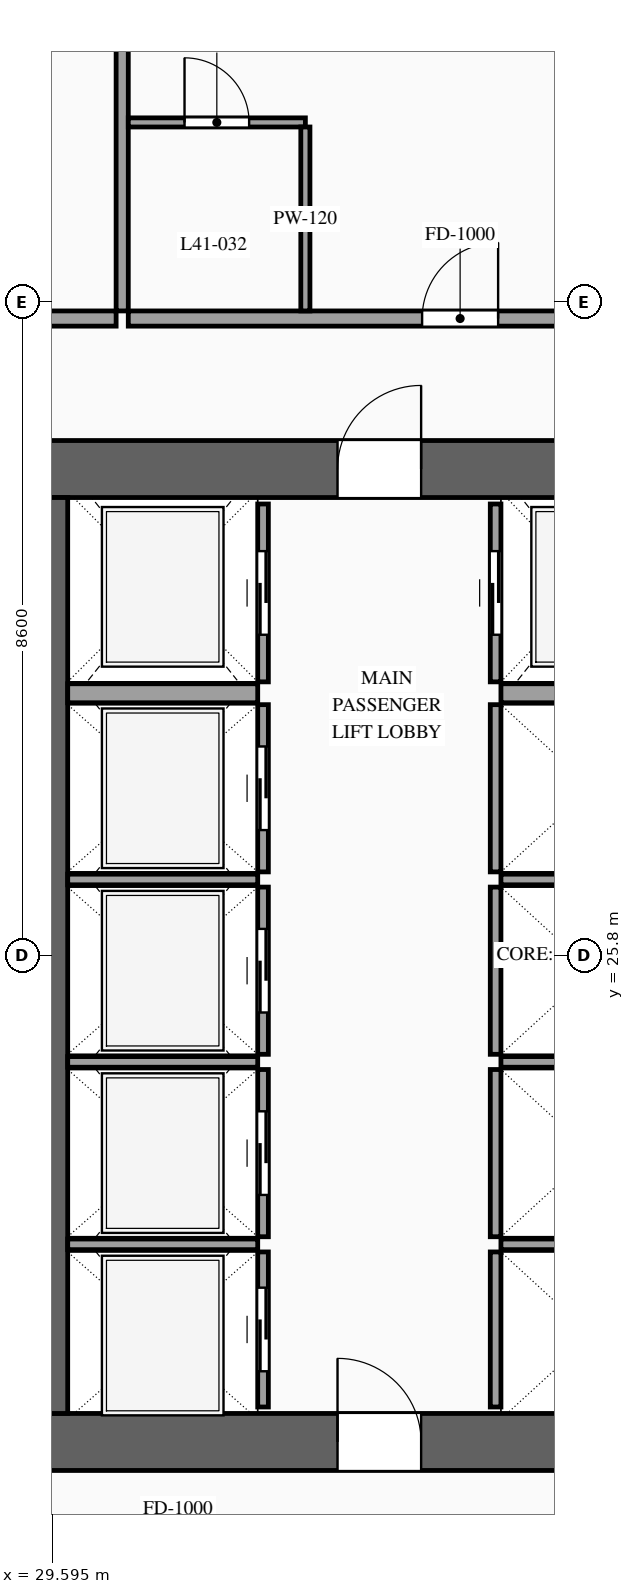
"""IFC4 building model, lengths in metres.
Left out: names, types, materials, properties, quantities, classifications, styles, units other than length and angle.
Written with IfcOpenShell. Run it as: python <this file> out.ifc"""

import sys

from ifc_helpers import new_model, si_unit, direction, frame, frame_2d, origin, place, context, subcontext, project, spatial, rectangle, extrude, source, transform, mapped, element, fill, save


model = new_model("IFC4")
c1 = context("Model", 3, precision=1e-05, world=origin(), true_north=direction((0.0, 1.0)))
c2 = subcontext(c1, "Body", "Model", "MODEL_VIEW")
j1 = project(units=[si_unit("LENGTHUNIT", "METRE"), si_unit("PLANEANGLEUNIT", "RADIAN")], contexts=[c1])
p1 = place(None, origin())
s1 = spatial("IfcSite", under=j1, at=p1, CompositionType="ELEMENT")
p2 = place(p1, origin())
s2 = spatial("IfcBuilding", under=s1, at=p2, CompositionType="ELEMENT")
p3 = place(p2, frame((0.0, 0.0, 156.0)))
s3 = spatial("IfcBuildingStorey", under=s2, at=p3, CompositionType="ELEMENT", Elevation=156.0)
p4 = place(p3, frame((23.425, 19.4, 0.0), z_axis=(0.0, 0.0, 1.0), x_axis=(1.0, 0.0, 0.0)))
e1 = element("IfcWall", 1, at=p4, inside=s3, PredefinedType="SHEAR", context=c2, shape_type="SweptSolid", body=[
    extrude(rectangle(XDim=27.15, YDim=0.75, at=frame_2d((13.575, 0.0))), origin(), (0.0, 0.0, 1.0), 3.6),
])
p5 = place(p4, frame((2.025, 0.0, 0.0)))
e2 = element("IfcOpeningElement", 2, at=p5, cuts=e1, PredefinedType="OPENING", context=c2, shape_type="SweptSolid", body=[
    extrude(rectangle(XDim=1.1, YDim=2.2, at=frame_2d((0.55, 1.1))), frame((0.0, 0.39, 0.0), z_axis=(0.0, -1.0, 0.0), x_axis=(1.0, 0.0, 0.0)), (0.0, 0.0, 1.0), 0.78),
])
p6 = place(p4, frame((9.925, 0.0, 0.0)))
e3 = element("IfcOpeningElement", 3, at=p6, cuts=e1, PredefinedType="OPENING", context=c2, shape_type="SweptSolid", body=[
    extrude(rectangle(XDim=1.1, YDim=2.2, at=frame_2d((0.55, 1.1))), frame((0.0, 0.39, 0.0), z_axis=(0.0, -1.0, 0.0), x_axis=(1.0, 0.0, 0.0)), (0.0, 0.0, 1.0), 0.78),
])
p7 = place(p4, frame((23.125, 0.0, 0.0)))
e4 = element("IfcOpeningElement", 4, at=p7, cuts=e1, PredefinedType="OPENING", context=c2, shape_type="SweptSolid", body=[
    extrude(rectangle(XDim=1.1, YDim=2.2, at=frame_2d((0.55, 1.1))), frame((0.0, 0.39, 0.0), z_axis=(0.0, -1.0, 0.0), x_axis=(1.0, 0.0, 0.0)), (0.0, 0.0, 1.0), 0.78),
])
p8 = place(p4, frame((19.745, 0.0, 0.0)))
e5 = element("IfcOpeningElement", 5, at=p8, cuts=e1, PredefinedType="OPENING", context=c2, shape_type="SweptSolid", body=[
    extrude(rectangle(XDim=0.9, YDim=2.15, at=frame_2d((0.45, 1.075))), frame((0.0, 0.39, 0.0), z_axis=(0.0, -1.0, 0.0), x_axis=(1.0, 0.0, 0.0)), (0.0, 0.0, 1.0), 0.78),
])
p9 = place(p4, frame((18.305, 0.0, 0.0)))
e6 = element("IfcOpeningElement", 6, at=p9, cuts=e1, PredefinedType="OPENING", context=c2, shape_type="SweptSolid", body=[
    extrude(rectangle(XDim=0.9, YDim=2.15, at=frame_2d((0.45, 1.075))), frame((0.0, 0.39, 0.0), z_axis=(0.0, -1.0, 0.0), x_axis=(1.0, 0.0, 0.0)), (0.0, 0.0, 1.0), 0.78),
])
p10 = place(p3, frame((23.425, 32.2, 0.0), z_axis=(0.0, 0.0, 1.0), x_axis=(1.0, 0.0, 0.0)))
e7 = element("IfcWall", 7, at=p10, inside=s3, PredefinedType="SHEAR", context=c2, shape_type="SweptSolid", body=[
    extrude(rectangle(XDim=27.15, YDim=0.75, at=frame_2d((13.575, 0.0))), origin(), (0.0, 0.0, 1.0), 3.6),
])
p11 = place(p10, frame((4.645, 0.0, 0.0)))
e8 = element("IfcOpeningElement", 8, at=p11, cuts=e7, PredefinedType="OPENING", context=c2, shape_type="SweptSolid", body=[
    extrude(rectangle(XDim=0.9, YDim=2.15, at=frame_2d((0.45, 1.075))), frame((0.0, 0.39, 0.0), z_axis=(0.0, -1.0, 0.0), x_axis=(1.0, 0.0, 0.0)), (0.0, 0.0, 1.0), 0.78),
])
p12 = place(p10, frame((9.925, 0.0, 0.0)))
e9 = element("IfcOpeningElement", 9, at=p12, cuts=e7, PredefinedType="OPENING", context=c2, shape_type="SweptSolid", body=[
    extrude(rectangle(XDim=1.1, YDim=2.2, at=frame_2d((0.55, 1.1))), frame((0.0, 0.39, 0.0), z_axis=(0.0, -1.0, 0.0), x_axis=(1.0, 0.0, 0.0)), (0.0, 0.0, 1.0), 0.78),
])
p13 = place(p10, frame((15.775, 0.0, 0.0)))
e10 = element("IfcOpeningElement", 10, at=p13, cuts=e7, PredefinedType="OPENING", context=c2, shape_type="SweptSolid", body=[
    extrude(rectangle(XDim=1.1, YDim=2.2, at=frame_2d((0.55, 1.1))), frame((0.0, 0.39, 0.0), z_axis=(0.0, -1.0, 0.0), x_axis=(1.0, 0.0, 0.0)), (0.0, 0.0, 1.0), 0.78),
])
p14 = place(p10, frame((18.305, 0.0, 0.0)))
e11 = element("IfcOpeningElement", 11, at=p14, cuts=e7, PredefinedType="OPENING", context=c2, shape_type="SweptSolid", body=[
    extrude(rectangle(XDim=0.9, YDim=2.15, at=frame_2d((0.45, 1.075))), frame((0.0, 0.39, 0.0), z_axis=(0.0, -1.0, 0.0), x_axis=(1.0, 0.0, 0.0)), (0.0, 0.0, 1.0), 0.78),
])
p15 = place(p10, frame((19.745, 0.0, 0.0)))
e12 = element("IfcOpeningElement", 12, at=p15, cuts=e7, PredefinedType="OPENING", context=c2, shape_type="SweptSolid", body=[
    extrude(rectangle(XDim=0.9, YDim=2.15, at=frame_2d((0.45, 1.075))), frame((0.0, 0.39, 0.0), z_axis=(0.0, -1.0, 0.0), x_axis=(1.0, 0.0, 0.0)), (0.0, 0.0, 1.0), 0.78),
])
m1 = source(origin(), c2, "Body", "SweptSolid", [
    extrude(rectangle(XDim=12.05, YDim=0.3, at=frame_2d((6.025, 0.0))), origin(), (0.0, 0.0, 1.0), 3.6),
])
p16 = place(p3, frame((29.65, 19.775, 0.0), z_axis=(0.0, 0.0, 1.0), x_axis=(0.0, 1.0, 0.0)))
e13 = element("IfcWall", 13, at=p16, inside=s3, PredefinedType="SOLIDWALL", context=c2, shape_type="MappedRepresentation", body=[
    mapped(m1, transform((0.0, 0.0, 0.0), scale=1.0)),
])
p17 = place(p3, frame((32.37, 19.86, 0.0), z_axis=(0.0, 0.0, 1.0), x_axis=(0.0, 1.0, 0.0)))
e14 = element("IfcWall", 14, at=p17, inside=s3, PredefinedType="SOLIDWALL", context=c2, shape_type="SweptSolid", body=[
    extrude(rectangle(XDim=2.04, YDim=0.14, at=frame_2d((1.02, 0.0))), origin(), (0.0, 0.0, 1.0), 3.38),
])
p18 = place(p17, frame((0.47, 0.0, 0.0)))
e15 = element("IfcOpeningElement", 15, at=p18, cuts=e14, PredefinedType="OPENING", context=c2, shape_type="SweptSolid", body=[
    extrude(rectangle(XDim=1.1, YDim=2.2, at=frame_2d((0.55, 1.1))), frame((0.0, 0.085, 0.0), z_axis=(0.0, -1.0, 0.0), x_axis=(1.0, 0.0, 0.0)), (0.0, 0.0, 1.0), 0.17),
])
m2 = source(origin(), c2, "Body", "SweptSolid", [
    extrude(rectangle(XDim=2.5, YDim=0.14, at=frame_2d((1.25, 0.0))), origin(), (0.0, 0.0, 1.0), 3.38),
])
p19 = place(p3, frame((29.8, 22.0, 0.0), z_axis=(0.0, 0.0, 1.0), x_axis=(1.0, 0.0, 0.0)))
e16 = element("IfcWall", 16, at=p19, inside=s3, PredefinedType="SOLIDWALL", context=c2, shape_type="MappedRepresentation", body=[
    mapped(m2, transform((0.0, 0.0, 0.0), scale=1.0)),
])
p20 = place(p3, frame((32.37, 22.1, 0.0), z_axis=(0.0, 0.0, 1.0), x_axis=(0.0, 1.0, 0.0)))
e17 = element("IfcWall", 17, at=p20, inside=s3, PredefinedType="SOLIDWALL", context=c2, shape_type="SweptSolid", body=[
    extrude(rectangle(XDim=2.2, YDim=0.14, at=frame_2d((1.1, 0.0))), origin(), (0.0, 0.0, 1.0), 3.38),
])
p21 = place(p20, frame((0.55, 0.0, 0.0)))
e18 = element("IfcOpeningElement", 18, at=p21, cuts=e17, PredefinedType="OPENING", context=c2, shape_type="SweptSolid", body=[
    extrude(rectangle(XDim=1.1, YDim=2.2, at=frame_2d((0.55, 1.1))), frame((0.0, 0.085, 0.0), z_axis=(0.0, -1.0, 0.0), x_axis=(1.0, 0.0, 0.0)), (0.0, 0.0, 1.0), 0.17),
])
p22 = place(p3, frame((29.8, 24.4, 0.0), z_axis=(0.0, 0.0, 1.0), x_axis=(1.0, 0.0, 0.0)))
e19 = element("IfcWall", 19, at=p22, inside=s3, PredefinedType="SOLIDWALL", context=c2, shape_type="MappedRepresentation", body=[
    mapped(m2, transform((0.0, 0.0, 0.0), scale=1.0)),
])
p23 = place(p3, frame((32.37, 24.5, 0.0), z_axis=(0.0, 0.0, 1.0), x_axis=(0.0, 1.0, 0.0)))
e20 = element("IfcWall", 20, at=p23, inside=s3, PredefinedType="SOLIDWALL", context=c2, shape_type="SweptSolid", body=[
    extrude(rectangle(XDim=2.2, YDim=0.14, at=frame_2d((1.1, 0.0))), origin(), (0.0, 0.0, 1.0), 3.38),
])
p24 = place(p23, frame((0.55, 0.0, 0.0)))
e21 = element("IfcOpeningElement", 21, at=p24, cuts=e20, PredefinedType="OPENING", context=c2, shape_type="SweptSolid", body=[
    extrude(rectangle(XDim=1.1, YDim=2.2, at=frame_2d((0.55, 1.1))), frame((0.0, 0.085, 0.0), z_axis=(0.0, -1.0, 0.0), x_axis=(1.0, 0.0, 0.0)), (0.0, 0.0, 1.0), 0.17),
])
p25 = place(p3, frame((29.8, 26.8, 0.0), z_axis=(0.0, 0.0, 1.0), x_axis=(1.0, 0.0, 0.0)))
e22 = element("IfcWall", 22, at=p25, inside=s3, PredefinedType="SOLIDWALL", context=c2, shape_type="MappedRepresentation", body=[
    mapped(m2, transform((0.0, 0.0, 0.0), scale=1.0)),
])
p26 = place(p3, frame((32.37, 26.9, 0.0), z_axis=(0.0, 0.0, 1.0), x_axis=(0.0, 1.0, 0.0)))
e23 = element("IfcWall", 23, at=p26, inside=s3, PredefinedType="SOLIDWALL", context=c2, shape_type="SweptSolid", body=[
    extrude(rectangle(XDim=2.2, YDim=0.14, at=frame_2d((1.1, 0.0))), origin(), (0.0, 0.0, 1.0), 3.38),
])
p27 = place(p26, frame((0.55, 0.0, 0.0)))
e24 = element("IfcOpeningElement", 24, at=p27, cuts=e23, PredefinedType="OPENING", context=c2, shape_type="SweptSolid", body=[
    extrude(rectangle(XDim=1.1, YDim=2.2, at=frame_2d((0.55, 1.1))), frame((0.0, 0.085, 0.0), z_axis=(0.0, -1.0, 0.0), x_axis=(1.0, 0.0, 0.0)), (0.0, 0.0, 1.0), 0.17),
])
p28 = place(p3, frame((32.37, 29.4, 0.0), z_axis=(0.0, 0.0, 1.0), x_axis=(0.0, 1.0, 0.0)))
e25 = element("IfcWall", 25, at=p28, inside=s3, PredefinedType="SOLIDWALL", context=c2, shape_type="SweptSolid", body=[
    extrude(rectangle(XDim=2.34, YDim=0.14, at=frame_2d((1.17, 0.0))), origin(), (0.0, 0.0, 1.0), 3.38),
])
p29 = place(p28, frame((0.62, 0.0, 0.0)))
e26 = element("IfcOpeningElement", 26, at=p29, cuts=e25, PredefinedType="OPENING", context=c2, shape_type="SweptSolid", body=[
    extrude(rectangle(XDim=1.1, YDim=2.2, at=frame_2d((0.55, 1.1))), frame((0.0, 0.085, 0.0), z_axis=(0.0, -1.0, 0.0), x_axis=(1.0, 0.0, 0.0)), (0.0, 0.0, 1.0), 0.17),
])
m3 = source(origin(), c2, "Body", "SweptSolid", [
    extrude(rectangle(XDim=2.5, YDim=0.25, at=frame_2d((1.25, 0.0))), origin(), (0.0, 0.0, 1.0), 3.38),
])
p30 = place(p3, frame((29.8, 29.25, 0.0), z_axis=(0.0, 0.0, 1.0), x_axis=(1.0, 0.0, 0.0)))
e27 = element("IfcWall", 27, at=p30, inside=s3, PredefinedType="SOLIDWALL", context=c2, shape_type="MappedRepresentation", body=[
    mapped(m3, transform((0.0, 0.0, 0.0), scale=1.0)),
])
m4 = source(origin(), c2, "Body", "SweptSolid", [
    extrude(rectangle(XDim=2.04, YDim=0.14, at=frame_2d((1.02, 0.0))), origin(), (0.0, 0.0, 1.0), 3.38),
])
p31 = place(p3, frame((35.43, 19.86, 0.0), z_axis=(0.0, 0.0, 1.0), x_axis=(0.0, 1.0, 0.0)))
e28 = element("IfcWall", 28, at=p31, inside=s3, PredefinedType="SOLIDWALL", context=c2, shape_type="MappedRepresentation", body=[
    mapped(m4, transform((0.0, 0.0, 0.0), scale=1.0)),
])
m5 = source(origin(), c2, "Body", "SweptSolid", [
    extrude(rectangle(XDim=2.4, YDim=0.14, at=frame_2d((1.2, 0.0))), origin(), (0.0, 0.0, 1.0), 3.38),
])
p32 = place(p3, frame((35.5, 22.0, 0.0), z_axis=(0.0, 0.0, 1.0), x_axis=(1.0, 0.0, 0.0)))
e29 = element("IfcWall", 29, at=p32, inside=s3, PredefinedType="SOLIDWALL", context=c2, shape_type="MappedRepresentation", body=[
    mapped(m5, transform((0.0, 0.0, 0.0), scale=1.0)),
])
m6 = source(origin(), c2, "Body", "SweptSolid", [
    extrude(rectangle(XDim=2.2, YDim=0.14, at=frame_2d((1.1, 0.0))), origin(), (0.0, 0.0, 1.0), 3.38),
])
p33 = place(p3, frame((35.43, 22.1, 0.0), z_axis=(0.0, 0.0, 1.0), x_axis=(0.0, 1.0, 0.0)))
e30 = element("IfcWall", 30, at=p33, inside=s3, PredefinedType="SOLIDWALL", context=c2, shape_type="MappedRepresentation", body=[
    mapped(m6, transform((0.0, 0.0, 0.0), scale=1.0)),
])
p34 = place(p3, frame((35.5, 24.4, 0.0), z_axis=(0.0, 0.0, 1.0), x_axis=(1.0, 0.0, 0.0)))
e31 = element("IfcWall", 31, at=p34, inside=s3, PredefinedType="SOLIDWALL", context=c2, shape_type="MappedRepresentation", body=[
    mapped(m5, transform((0.0, 0.0, 0.0), scale=1.0)),
])
p35 = place(p3, frame((35.43, 24.5, 0.0), z_axis=(0.0, 0.0, 1.0), x_axis=(0.0, 1.0, 0.0)))
e32 = element("IfcWall", 32, at=p35, inside=s3, PredefinedType="SOLIDWALL", context=c2, shape_type="MappedRepresentation", body=[
    mapped(m6, transform((0.0, 0.0, 0.0), scale=1.0)),
])
p36 = place(p3, frame((35.5, 26.8, 0.0), z_axis=(0.0, 0.0, 1.0), x_axis=(1.0, 0.0, 0.0)))
e33 = element("IfcWall", 33, at=p36, inside=s3, PredefinedType="SOLIDWALL", context=c2, shape_type="MappedRepresentation", body=[
    mapped(m5, transform((0.0, 0.0, 0.0), scale=1.0)),
])
m7 = source(origin(), c2, "Body", "SweptSolid", [
    extrude(rectangle(XDim=2.2, YDim=0.14, at=frame_2d((1.1, 0.0))), origin(), (0.0, 0.0, 1.0), 3.38),
])
p37 = place(p3, frame((35.43, 26.9, 0.0), z_axis=(0.0, 0.0, 1.0), x_axis=(0.0, 1.0, 0.0)))
e34 = element("IfcWall", 34, at=p37, inside=s3, PredefinedType="SOLIDWALL", context=c2, shape_type="MappedRepresentation", body=[
    mapped(m7, transform((0.0, 0.0, 0.0), scale=1.0)),
])
p38 = place(p3, frame((35.43, 29.4, 0.0), z_axis=(0.0, 0.0, 1.0), x_axis=(0.0, 1.0, 0.0)))
e35 = element("IfcWall", 35, at=p38, inside=s3, PredefinedType="SOLIDWALL", context=c2, shape_type="SweptSolid", body=[
    extrude(rectangle(XDim=2.34, YDim=0.14, at=frame_2d((1.17, 0.0))), origin(), (0.0, 0.0, 1.0), 3.38),
])
p39 = place(p38, frame((0.62, 0.0, 0.0)))
e36 = element("IfcOpeningElement", 36, at=p39, cuts=e35, PredefinedType="OPENING", context=c2, shape_type="SweptSolid", body=[
    extrude(rectangle(XDim=1.1, YDim=2.2, at=frame_2d((0.55, 1.1))), frame((0.0, 0.085, 0.0), z_axis=(0.0, -1.0, 0.0), x_axis=(1.0, 0.0, 0.0)), (0.0, 0.0, 1.0), 0.17),
])
m8 = source(origin(), c2, "Body", "SweptSolid", [
    extrude(rectangle(XDim=2.4, YDim=0.25, at=frame_2d((1.2, 0.0))), origin(), (0.0, 0.0, 1.0), 3.38),
])
p40 = place(p3, frame((35.5, 29.25, 0.0), z_axis=(0.0, 0.0, 1.0), x_axis=(1.0, 0.0, 0.0)))
e37 = element("IfcWall", 37, at=p40, inside=s3, PredefinedType="SOLIDWALL", context=c2, shape_type="MappedRepresentation", body=[
    mapped(m8, transform((0.0, 0.0, 0.0), scale=1.0)),
])
p41 = place(p3, frame((22.757, 34.18, 0.0), z_axis=(0.0, 0.0, 1.0), x_axis=(1.0, 0.0, 0.0)))
e38 = element("IfcWall", 38, at=p41, inside=s3, PredefinedType="PARTITIONING", context=c2, shape_type="SweptSolid", body=[
    extrude(rectangle(XDim=7.68, YDim=0.2, at=frame_2d((3.84, 0.0))), origin(), (0.0, 0.0, 1.0), 3.38),
])
p42 = place(p41, frame((4.545, 0.0, 0.0)))
e39 = element("IfcOpeningElement", 39, at=p42, cuts=e38, PredefinedType="OPENING", context=c2, shape_type="SweptSolid", body=[
    extrude(rectangle(XDim=1.0, YDim=2.2, at=frame_2d((0.5, 1.1))), frame((0.0, 0.115, 0.0), z_axis=(0.0, -1.0, 0.0), x_axis=(1.0, 0.0, 0.0)), (0.0, 0.0, 1.0), 0.23),
])
m9 = source(origin(), c2, "Body", "SweptSolid", [
    extrude(rectangle(XDim=14.97, YDim=0.16, at=frame_2d((7.485, 0.0))), origin(), (0.0, 0.0, 1.0), 3.38),
])
p43 = place(p3, frame((30.517, 34.28, 0.0), z_axis=(0.0, 0.0, 1.0), x_axis=(0.0, 1.0, 0.0)))
e40 = element("IfcWall", 40, at=p43, inside=s3, PredefinedType="PARTITIONING", context=c2, shape_type="MappedRepresentation", body=[
    mapped(m9, transform((0.0, 0.0, 0.0), scale=1.0)),
])
p44 = place(p3, frame((30.597, 34.18, 0.0), z_axis=(0.0, 0.0, 1.0), x_axis=(1.0, 0.0, 0.0)))
e41 = element("IfcWall", 41, at=p44, inside=s3, PredefinedType="PARTITIONING", context=c2, shape_type="SweptSolid", body=[
    extrude(rectangle(XDim=6.323, YDim=0.2, at=frame_2d((3.162, 0.0))), origin(), (0.0, 0.0, 1.0), 3.38),
])
p45 = place(p44, frame((3.866, 0.0, 0.0)))
e42 = element("IfcOpeningElement", 42, at=p45, cuts=e41, PredefinedType="OPENING", context=c2, shape_type="SweptSolid", body=[
    extrude(rectangle(XDim=1.0, YDim=2.2, at=frame_2d((0.5, 1.1))), frame((0.0, 0.115, 0.0), z_axis=(0.0, -1.0, 0.0), x_axis=(1.0, 0.0, 0.0)), (0.0, 0.0, 1.0), 0.23),
])
p46 = place(p3, frame((30.597, 36.76, 0.0), z_axis=(0.0, 0.0, 1.0), x_axis=(1.0, 0.0, 0.0)))
e43 = element("IfcWall", 43, at=p46, inside=s3, PredefinedType="PARTITIONING", context=c2, shape_type="SweptSolid", body=[
    extrude(rectangle(XDim=2.33, YDim=0.12, at=frame_2d((1.165, 0.0))), origin(), (0.0, 0.0, 1.0), 3.38),
])
p47 = place(p46, frame((0.74, 0.0, 0.0)))
e44 = element("IfcOpeningElement", 44, at=p47, cuts=e43, PredefinedType="OPENING", context=c2, shape_type="SweptSolid", body=[
    extrude(rectangle(XDim=0.85, YDim=2.1, at=frame_2d((0.425, 1.05))), frame((0.0, 0.075, 0.0), z_axis=(0.0, -1.0, 0.0), x_axis=(1.0, 0.0, 0.0)), (0.0, 0.0, 1.0), 0.15),
])
m10 = source(origin(), c2, "Body", "SweptSolid", [
    extrude(rectangle(XDim=2.42, YDim=0.12, at=frame_2d((1.21, 0.0))), origin(), (0.0, 0.0, 1.0), 3.38),
])
p48 = place(p3, frame((32.927, 34.28, 0.0), z_axis=(0.0, 0.0, 1.0), x_axis=(0.0, 1.0, 0.0)))
e45 = element("IfcWall", 45, at=p48, inside=s3, PredefinedType="PARTITIONING", context=c2, shape_type="MappedRepresentation", body=[
    mapped(m10, transform((0.0, 0.0, 0.0), scale=1.0)),
])
m11 = source(origin(), c2, "Body", "SweptSolid", [
    extrude(rectangle(XDim=1.1, YDim=2.2, at=frame_2d((0.55, 1.1))), frame((0.0, 0.025, 0.0), z_axis=(0.0, -1.0, 0.0), x_axis=(1.0, 0.0, 0.0)), (0.0, 0.0, 1.0), 0.05),
])
p49 = place(p18, origin())
e46 = element("IfcDoor", 46, at=p49, inside=s3, OperationType="SLIDING_TO_LEFT", PredefinedType="DOOR", context=c2, shape_type="MappedRepresentation", body=[
    mapped(m11, transform((0.0, 0.0, 0.0), scale=1.0)),
])
fill(e15, e46)
p50 = place(p21, origin())
e47 = element("IfcDoor", 47, at=p50, inside=s3, OperationType="SLIDING_TO_RIGHT", PredefinedType="DOOR", context=c2, shape_type="MappedRepresentation", body=[
    mapped(m11, transform((0.0, 0.0, 0.0), scale=1.0)),
])
fill(e18, e47)
p51 = place(p24, origin())
e48 = element("IfcDoor", 48, at=p51, inside=s3, OperationType="SLIDING_TO_LEFT", PredefinedType="DOOR", context=c2, shape_type="MappedRepresentation", body=[
    mapped(m11, transform((0.0, 0.0, 0.0), scale=1.0)),
])
fill(e21, e48)
p52 = place(p27, origin())
e49 = element("IfcDoor", 49, at=p52, inside=s3, OperationType="SLIDING_TO_RIGHT", PredefinedType="DOOR", context=c2, shape_type="MappedRepresentation", body=[
    mapped(m11, transform((0.0, 0.0, 0.0), scale=1.0)),
])
fill(e24, e49)
p53 = place(p29, origin())
e50 = element("IfcDoor", 50, at=p53, inside=s3, OperationType="SLIDING_TO_LEFT", PredefinedType="DOOR", context=c2, shape_type="MappedRepresentation", body=[
    mapped(m11, transform((0.0, 0.0, 0.0), scale=1.0)),
])
fill(e26, e50)
p54 = place(p39, origin())
e51 = element("IfcDoor", 51, at=p54, inside=s3, OperationType="SLIDING_TO_RIGHT", PredefinedType="DOOR", context=c2, shape_type="MappedRepresentation", body=[
    mapped(m11, transform((0.0, 0.0, 0.0), scale=1.0)),
])
fill(e36, e51)
m12 = source(origin(), c2, "Body", "SweptSolid", [
    extrude(rectangle(XDim=1.1, YDim=2.2, at=frame_2d((0.55, 1.1))), frame((0.0, 0.025, 0.0), z_axis=(0.0, -1.0, 0.0), x_axis=(1.0, 0.0, 0.0)), (0.0, 0.0, 1.0), 0.05),
])
p55 = place(p6, origin())
e52 = element("IfcDoor", 52, at=p55, inside=s3, OperationType="SINGLE_SWING_LEFT", PredefinedType="DOOR", context=c2, shape_type="MappedRepresentation", body=[
    mapped(m12, transform((0.0, 0.0, 0.0), scale=1.0)),
])
fill(e3, e52)
p56 = place(p12, origin())
e53 = element("IfcDoor", 53, at=p56, inside=s3, OperationType="SINGLE_SWING_RIGHT", PredefinedType="DOOR", context=c2, shape_type="MappedRepresentation", body=[
    mapped(m12, transform((0.0, 0.0, 0.0), scale=1.0)),
])
fill(e9, e53)
m13 = source(origin(), c2, "Body", "SweptSolid", [
    extrude(rectangle(XDim=1.0, YDim=2.2, at=frame_2d((0.5, 1.1))), frame((0.0, 0.025, 0.0), z_axis=(0.0, -1.0, 0.0), x_axis=(1.0, 0.0, 0.0)), (0.0, 0.0, 1.0), 0.05),
])
p57 = place(p45, origin())
e54 = element("IfcDoor", 54, at=p57, inside=s3, OperationType="SINGLE_SWING_RIGHT", PredefinedType="DOOR", context=c2, shape_type="MappedRepresentation", body=[
    mapped(m13, transform((0.0, 0.0, 0.0), scale=1.0)),
])
fill(e42, e54)
m14 = source(origin(), c2, "Body", "SweptSolid", [
    extrude(rectangle(XDim=0.85, YDim=2.1, at=frame_2d((0.425, 1.05))), frame((0.0, 0.025, 0.0), z_axis=(0.0, -1.0, 0.0), x_axis=(1.0, 0.0, 0.0)), (0.0, 0.0, 1.0), 0.05),
])
p58 = place(p47, origin())
e55 = element("IfcDoor", 55, at=p58, inside=s3, OperationType="SINGLE_SWING_LEFT", PredefinedType="DOOR", context=c2, shape_type="MappedRepresentation", body=[
    mapped(m14, transform((0.0, 0.0, 0.0), scale=1.0)),
])
fill(e44, e55)
save(model, sys.argv[1])
